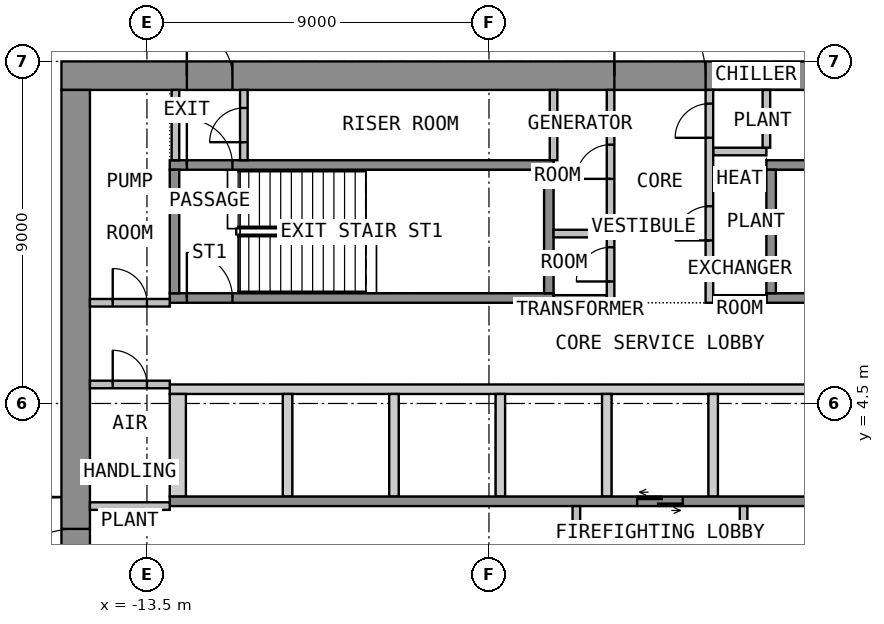
"""IFC4 building model, lengths in metres.
Left out: names, types, materials, properties, quantities, classifications, styles, units other than length and angle.
Written with IfcOpenShell. Run it as: python <this file> out.ifc"""

import sys

from ifc_helpers import new_model, si_unit, direction, frame, frame_2d, origin, place, context, subcontext, project, spatial, polyline, rectangle, outline, extrude, element, fill, save


model = new_model("IFC4")
c1 = context("Model", 3, precision=1e-05, world=origin(), true_north=direction((0.0, 1.0)))
c2 = subcontext(c1, "Body", "Model", "MODEL_VIEW")
j1 = project(units=[si_unit("LENGTHUNIT", "METRE"), si_unit("PLANEANGLEUNIT", "RADIAN")], contexts=[c1])
p1 = place(None, origin())
s1 = spatial("IfcSite", under=j1, at=p1, CompositionType="ELEMENT")
p2 = place(p1, origin())
s2 = spatial("IfcBuilding", under=s1, at=p2, CompositionType="ELEMENT")
p3 = place(p2, frame((0.0, 0.0, 128.1)))
s3 = spatial("IfcBuildingStorey", under=s2, at=p3, CompositionType="ELEMENT", Elevation=128.1)
p4 = place(p3, frame((-15.75, 13.125, 0.0), z_axis=(0.0, 0.0, 1.0), x_axis=(1.0, 0.0, 0.0)))
e1 = element("IfcWall", 1, at=p4, inside=s3, PredefinedType="SHEAR", context=c2, shape_type="SweptSolid", body=[
    extrude(rectangle(XDim=31.5, YDim=0.75, at=frame_2d((15.75, 0.0))), origin(), (0.0, 0.0, 1.0), 4.175),
])
p5 = place(p4, frame((14.55, 0.0, 0.0)))
e2 = element("IfcOpeningElement", 2, at=p5, cuts=e1, PredefinedType="OPENING", context=c2, shape_type="SweptSolid", body=[
    extrude(rectangle(XDim=2.4, YDim=2.1, at=frame_2d((1.2, 1.05))), frame((0.0, 0.385, 0.0), z_axis=(0.0, -1.0, 0.0), x_axis=(1.0, 0.0, 0.0)), (0.0, 0.0, 1.0), 0.77),
])
p6 = place(p4, frame((3.3, 0.0, 0.0)))
e3 = element("IfcOpeningElement", 3, at=p6, cuts=e1, PredefinedType="OPENING", context=c2, shape_type="SweptSolid", body=[
    extrude(rectangle(XDim=1.2, YDim=2.1, at=frame_2d((0.6, 1.05))), frame((0.0, 0.385, 0.0), z_axis=(0.0, -1.0, 0.0), x_axis=(1.0, 0.0, 0.0)), (0.0, 0.0, 1.0), 0.77),
])
p7 = place(p4, frame((27.0, 0.0, 0.0)))
e4 = element("IfcOpeningElement", 4, at=p7, cuts=e1, PredefinedType="OPENING", context=c2, shape_type="SweptSolid", body=[
    extrude(rectangle(XDim=1.2, YDim=2.1, at=frame_2d((0.6, 1.05))), frame((0.0, 0.385, 0.0), z_axis=(0.0, -1.0, 0.0), x_axis=(1.0, 0.0, 0.0)), (0.0, 0.0, 1.0), 0.77),
])
p8 = place(p3, frame((-15.375, -12.75, 0.0), z_axis=(0.0, 0.0, 1.0), x_axis=(0.0, 1.0, 0.0)))
e5 = element("IfcWall", 5, at=p8, inside=s3, PredefinedType="SHEAR", context=c2, shape_type="SweptSolid", body=[
    extrude(rectangle(XDim=25.5, YDim=0.75, at=frame_2d((12.75, 0.0))), origin(), (0.0, 0.0, 1.0), 4.175),
])
p9 = place(p8, frame((11.55, 0.0, 0.0)))
e6 = element("IfcOpeningElement", 6, at=p9, cuts=e5, PredefinedType="OPENING", context=c2, shape_type="SweptSolid", body=[
    extrude(rectangle(XDim=2.4, YDim=2.1, at=frame_2d((1.2, 1.05))), frame((0.0, 0.385, 0.0), z_axis=(0.0, -1.0, 0.0), x_axis=(1.0, 0.0, 0.0)), (0.0, 0.0, 1.0), 0.77),
])
p10 = place(p3, origin())
e7 = element("IfcWall", 7, at=p10, inside=s3, PredefinedType="SHEAR", context=c2, shape_type="SweptSolid", body=[
    extrude(outline(polyline([(-12.9, 4.75), (12.9, 4.75), (12.9, 5.0), (-12.9, 5.0), (-12.9, 4.75)])), origin(), (0.0, 0.0, 1.0), 4.175),
])
p11 = place(p3, origin())
e8 = element("IfcWall", 8, at=p11, inside=s3, PredefinedType="SHEAR", context=c2, shape_type="SweptSolid", body=[
    extrude(outline(polyline([(-12.9, 2.05), (-12.475, 2.05), (-12.475, 4.75), (-12.9, 4.75), (-12.9, 2.05)])), origin(), (0.0, 0.0, 1.0), 4.175),
])
p12 = place(p3, origin())
e9 = element("IfcWall", 9, at=p12, inside=s3, PredefinedType="SHEAR", context=c2, shape_type="SweptSolid", body=[
    extrude(outline(polyline([(-9.925, 2.05), (-9.675, 2.05), (-9.675, 4.75), (-9.925, 4.75), (-9.925, 2.05)])), origin(), (0.0, 0.0, 1.0), 4.175),
])
p13 = place(p3, origin())
e10 = element("IfcWall", 10, at=p13, inside=s3, PredefinedType="SHEAR", context=c2, shape_type="SweptSolid", body=[
    extrude(outline(polyline([(-7.125, 2.05), (-6.875, 2.05), (-6.875, 4.75), (-7.125, 4.75), (-7.125, 2.05)])), origin(), (0.0, 0.0, 1.0), 4.175),
])
p14 = place(p3, origin())
e11 = element("IfcWall", 11, at=p14, inside=s3, PredefinedType="SHEAR", context=c2, shape_type="SweptSolid", body=[
    extrude(outline(polyline([(-4.325, 2.05), (-4.075, 2.05), (-4.075, 4.75), (-4.325, 4.75), (-4.325, 2.05)])), origin(), (0.0, 0.0, 1.0), 4.175),
])
p15 = place(p3, origin())
e12 = element("IfcWall", 12, at=p15, inside=s3, PredefinedType="SHEAR", context=c2, shape_type="SweptSolid", body=[
    extrude(outline(polyline([(-1.525, 2.05), (-1.275, 2.05), (-1.275, 4.75), (-1.525, 4.75), (-1.525, 2.05)])), origin(), (0.0, 0.0, 1.0), 4.175),
])
p16 = place(p3, origin())
e13 = element("IfcWall", 13, at=p16, inside=s3, PredefinedType="SHEAR", context=c2, shape_type="SweptSolid", body=[
    extrude(outline(polyline([(1.275, 2.05), (1.525, 2.05), (1.525, 4.75), (1.275, 4.75), (1.275, 2.05)])), origin(), (0.0, 0.0, 1.0), 4.175),
])
p17 = place(p3, frame((-12.9, 1.925, 0.0), z_axis=(0.0, 0.0, 1.0), x_axis=(1.0, 0.0, 0.0)))
e14 = element("IfcWall", 14, at=p17, inside=s3, PredefinedType="SHEAR", context=c2, shape_type="SweptSolid", body=[
    extrude(rectangle(XDim=25.8, YDim=0.25, at=frame_2d((12.9, 0.0))), origin(), (0.0, 0.0, 1.0), 4.175),
])
p18 = place(p17, frame((12.3, 0.0, 0.0)))
e15 = element("IfcOpeningElement", 15, at=p18, cuts=e14, PredefinedType="OPENING", context=c2, shape_type="SweptSolid", body=[
    extrude(rectangle(XDim=1.2, YDim=2.1, at=frame_2d((0.6, 1.05))), frame((0.0, 0.135, 0.0), z_axis=(0.0, -1.0, 0.0), x_axis=(1.0, 0.0, 0.0)), (0.0, 0.0, 1.0), 0.27),
])
p19 = place(p17, frame((23.5, 0.0, 0.0)))
e16 = element("IfcOpeningElement", 16, at=p19, cuts=e14, PredefinedType="OPENING", context=c2, shape_type="SweptSolid", body=[
    extrude(rectangle(XDim=1.2, YDim=2.1, at=frame_2d((0.6, 1.05))), frame((0.0, 0.135, 0.0), z_axis=(0.0, -1.0, 0.0), x_axis=(1.0, 0.0, 0.0)), (0.0, 0.0, 1.0), 0.27),
])
p20 = place(p3, frame((-2.2, -1.8, 0.0), z_axis=(0.0, 0.0, 1.0), x_axis=(0.0, 1.0, 0.0)))
e17 = element("IfcWall", 17, at=p20, inside=s3, PredefinedType="PARTITIONING", context=c2, shape_type="SweptSolid", body=[
    extrude(rectangle(XDim=3.6, YDim=0.2, at=frame_2d((1.8, 0.0))), origin(), (0.0, 0.0, 1.0), 4.175),
])
p21 = place(p20, frame((1.2, 0.0, 0.0)))
e18 = element("IfcOpeningElement", 18, at=p21, cuts=e17, PredefinedType="OPENING", context=c2, shape_type="SweptSolid", body=[
    extrude(rectangle(XDim=1.2, YDim=2.1, at=frame_2d((0.6, 1.05))), frame((0.0, 0.11, 0.0), z_axis=(0.0, -1.0, 0.0), x_axis=(1.0, 0.0, 0.0)), (0.0, 0.0, 1.0), 0.22),
])
p22 = place(p3, frame((2.2, -1.8, 0.0), z_axis=(0.0, 0.0, 1.0), x_axis=(0.0, 1.0, 0.0)))
e19 = element("IfcWall", 19, at=p22, inside=s3, PredefinedType="PARTITIONING", context=c2, shape_type="SweptSolid", body=[
    extrude(rectangle(XDim=3.6, YDim=0.2, at=frame_2d((1.8, 0.0))), origin(), (0.0, 0.0, 1.0), 4.175),
])
p23 = place(p22, frame((1.2, 0.0, 0.0)))
e20 = element("IfcOpeningElement", 20, at=p23, cuts=e19, PredefinedType="OPENING", context=c2, shape_type="SweptSolid", body=[
    extrude(rectangle(XDim=1.2, YDim=2.1, at=frame_2d((0.6, 1.05))), frame((0.0, 0.11, 0.0), z_axis=(0.0, -1.0, 0.0), x_axis=(1.0, 0.0, 0.0)), (0.0, 0.0, 1.0), 0.22),
])
p24 = place(p3, frame((-12.9, 7.275, 0.0), z_axis=(0.0, 0.0, 1.0), x_axis=(1.0, 0.0, 0.0)))
e21 = element("IfcWall", 21, at=p24, inside=s3, PredefinedType="SHEAR", context=c2, shape_type="SweptSolid", body=[
    extrude(rectangle(XDim=10.1, YDim=0.25, at=frame_2d((5.05, 0.0))), origin(), (0.0, 0.0, 1.0), 4.175),
])
p25 = place(p24, frame((0.45, 0.0, 0.0)))
e22 = element("IfcOpeningElement", 22, at=p25, cuts=e21, PredefinedType="OPENING", context=c2, shape_type="SweptSolid", body=[
    extrude(rectangle(XDim=1.2, YDim=2.1, at=frame_2d((0.6, 1.05))), frame((0.0, 0.135, 0.0), z_axis=(0.0, -1.0, 0.0), x_axis=(1.0, 0.0, 0.0)), (0.0, 0.0, 1.0), 0.27),
])
p26 = place(p3, frame((-12.9, 10.775, 0.0), z_axis=(0.0, 0.0, 1.0), x_axis=(1.0, 0.0, 0.0)))
e23 = element("IfcWall", 23, at=p26, inside=s3, PredefinedType="SHEAR", context=c2, shape_type="SweptSolid", body=[
    extrude(rectangle(XDim=10.1, YDim=0.25, at=frame_2d((5.05, 0.0))), origin(), (0.0, 0.0, 1.0), 4.175),
])
p27 = place(p26, frame((0.45, 0.0, 0.0)))
e24 = element("IfcOpeningElement", 24, at=p27, cuts=e23, PredefinedType="OPENING", context=c2, shape_type="SweptSolid", body=[
    extrude(rectangle(XDim=1.2, YDim=2.1, at=frame_2d((0.6, 1.05))), frame((0.0, 0.135, 0.0), z_axis=(0.0, -1.0, 0.0), x_axis=(1.0, 0.0, 0.0)), (0.0, 0.0, 1.0), 0.27),
])
for number, where, z_axis, x_axis in (
    (25, (-12.775, 7.4, 0.0), (0.0, 0.0, 1.0), (0.0, 1.0, 0.0)),
    (26, (-2.925, 7.4, 0.0), (0.0, 0.0, 1.0), (0.0, 1.0, 0.0)),
):
    element("IfcWall", number, at=place(p3, frame(where, z_axis=z_axis, x_axis=x_axis)), inside=s3, PredefinedType="SHEAR", context=c2, shape_type="SweptSolid", body=[
        extrude(rectangle(XDim=3.25, YDim=0.25, at=frame_2d((1.625, 0.0))), origin(), (0.0, 0.0, 1.0), 4.175),
    ])
p28 = place(p3, frame((2.8, 7.275, 0.0), z_axis=(0.0, 0.0, 1.0), x_axis=(1.0, 0.0, 0.0)))
e27 = element("IfcWall", 27, at=p28, inside=s3, PredefinedType="SHEAR", context=c2, shape_type="SweptSolid", body=[
    extrude(rectangle(XDim=10.1, YDim=0.25, at=frame_2d((5.05, 0.0))), origin(), (0.0, 0.0, 1.0), 4.175),
])
p29 = place(p28, frame((8.45, 0.0, 0.0)))
e28 = element("IfcOpeningElement", 28, at=p29, cuts=e27, PredefinedType="OPENING", context=c2, shape_type="SweptSolid", body=[
    extrude(rectangle(XDim=1.2, YDim=2.1, at=frame_2d((0.6, 1.05))), frame((0.0, 0.135, 0.0), z_axis=(0.0, -1.0, 0.0), x_axis=(1.0, 0.0, 0.0)), (0.0, 0.0, 1.0), 0.27),
])
p30 = place(p3, frame((2.8, 10.775, 0.0), z_axis=(0.0, 0.0, 1.0), x_axis=(1.0, 0.0, 0.0)))
e29 = element("IfcWall", 29, at=p30, inside=s3, PredefinedType="SHEAR", context=c2, shape_type="SweptSolid", body=[
    extrude(rectangle(XDim=10.1, YDim=0.25, at=frame_2d((5.05, 0.0))), origin(), (0.0, 0.0, 1.0), 4.175),
])
p31 = place(p30, frame((8.45, 0.0, 0.0)))
e30 = element("IfcOpeningElement", 30, at=p31, cuts=e29, PredefinedType="OPENING", context=c2, shape_type="SweptSolid", body=[
    extrude(rectangle(XDim=1.2, YDim=2.1, at=frame_2d((0.6, 1.05))), frame((0.0, 0.135, 0.0), z_axis=(0.0, -1.0, 0.0), x_axis=(1.0, 0.0, 0.0)), (0.0, 0.0, 1.0), 0.27),
])
p32 = place(p3, frame((2.925, 7.4, 0.0), z_axis=(0.0, 0.0, 1.0), x_axis=(0.0, 1.0, 0.0)))
e31 = element("IfcWall", 31, at=p32, inside=s3, PredefinedType="SHEAR", context=c2, shape_type="SweptSolid", body=[
    extrude(rectangle(XDim=3.25, YDim=0.25, at=frame_2d((1.625, 0.0))), origin(), (0.0, 0.0, 1.0), 4.175),
])
for number, where, z_axis, x_axis in (
    (32, (-2.8, 7.25, 0.0), (0.0, 0.0, 1.0), (1.0, 0.0, 0.0)),
    (33, (-2.8, 8.97, 0.0), (0.0, 0.0, 1.0), (1.0, 0.0, 0.0)),
    (34, (1.4, 7.25, 0.0), (0.0, 0.0, 1.0), (1.0, 0.0, 0.0)),
    (35, (1.4, 11.13, 0.0), (0.0, 0.0, 1.0), (1.0, 0.0, 0.0)),
):
    element("IfcWall", number, at=place(p3, frame(where, z_axis=z_axis, x_axis=x_axis)), inside=s3, PredefinedType="PARTITIONING", context=c2, shape_type="SweptSolid", body=[
        extrude(rectangle(XDim=1.4, YDim=0.2, at=frame_2d((0.7, 0.0))), origin(), (0.0, 0.0, 1.0), 4.175),
    ])
p33 = place(p3, frame((-1.3, 7.15, 0.0), z_axis=(0.0, 0.0, 1.0), x_axis=(0.0, 1.0, 0.0)))
e36 = element("IfcWall", 36, at=p33, inside=s3, PredefinedType="PARTITIONING", context=c2, shape_type="SweptSolid", body=[
    extrude(rectangle(XDim=5.6, YDim=0.2, at=frame_2d((2.8, 0.0))), origin(), (0.0, 0.0, 1.0), 4.175),
])
p34 = place(p33, frame((0.56, 0.0, 0.0)))
e37 = element("IfcOpeningElement", 37, at=p34, cuts=e36, PredefinedType="OPENING", context=c2, shape_type="SweptSolid", body=[
    extrude(rectangle(XDim=0.9, YDim=2.1, at=frame_2d((0.45, 1.05))), frame((0.0, 0.11, 0.0), z_axis=(0.0, -1.0, 0.0), x_axis=(1.0, 0.0, 0.0)), (0.0, 0.0, 1.0), 0.22),
])
p35 = place(p33, frame((3.26, 0.0, 0.0)))
e38 = element("IfcOpeningElement", 38, at=p35, cuts=e36, PredefinedType="OPENING", context=c2, shape_type="SweptSolid", body=[
    extrude(rectangle(XDim=0.9, YDim=2.1, at=frame_2d((0.45, 1.05))), frame((0.0, 0.11, 0.0), z_axis=(0.0, -1.0, 0.0), x_axis=(1.0, 0.0, 0.0)), (0.0, 0.0, 1.0), 0.22),
])
p36 = place(p3, frame((1.3, 7.15, 0.0), z_axis=(0.0, 0.0, 1.0), x_axis=(0.0, 1.0, 0.0)))
e39 = element("IfcWall", 39, at=p36, inside=s3, PredefinedType="PARTITIONING", context=c2, shape_type="SweptSolid", body=[
    extrude(rectangle(XDim=5.6, YDim=0.2, at=frame_2d((2.8, 0.0))), origin(), (0.0, 0.0, 1.0), 4.175),
])
p37 = place(p36, frame((1.64, 0.0, 0.0)))
e40 = element("IfcOpeningElement", 40, at=p37, cuts=e39, PredefinedType="OPENING", context=c2, shape_type="SweptSolid", body=[
    extrude(rectangle(XDim=0.9, YDim=2.1, at=frame_2d((0.45, 1.05))), frame((0.0, 0.11, 0.0), z_axis=(0.0, -1.0, 0.0), x_axis=(1.0, 0.0, 0.0)), (0.0, 0.0, 1.0), 0.22),
])
p38 = place(p36, frame((4.34, 0.0, 0.0)))
e41 = element("IfcOpeningElement", 41, at=p38, cuts=e39, PredefinedType="OPENING", context=c2, shape_type="SweptSolid", body=[
    extrude(rectangle(XDim=0.9, YDim=2.1, at=frame_2d((0.45, 1.05))), frame((0.0, 0.11, 0.0), z_axis=(0.0, -1.0, 0.0), x_axis=(1.0, 0.0, 0.0)), (0.0, 0.0, 1.0), 0.22),
])
p39 = place(p3, frame((-12.75, 10.9, 0.0), z_axis=(0.0, 0.0, 1.0), x_axis=(0.0, 1.0, 0.0)))
e42 = element("IfcWall", 42, at=p39, inside=s3, PredefinedType="PARTITIONING", context=c2, shape_type="SweptSolid", body=[
    extrude(rectangle(XDim=1.85, YDim=0.2, at=frame_2d((0.925, 0.0))), origin(), (0.0, 0.0, 1.0), 4.175),
])
p40 = place(p3, frame((-10.95, 10.9, 0.0), z_axis=(0.0, 0.0, 1.0), x_axis=(0.0, 1.0, 0.0)))
e43 = element("IfcWall", 43, at=p40, inside=s3, PredefinedType="PARTITIONING", context=c2, shape_type="SweptSolid", body=[
    extrude(rectangle(XDim=1.85, YDim=0.2, at=frame_2d((0.925, 0.0))), origin(), (0.0, 0.0, 1.0), 4.175),
])
p41 = place(p40, frame((0.475, 0.0, 0.0)))
e44 = element("IfcOpeningElement", 44, at=p41, cuts=e43, PredefinedType="OPENING", context=c2, shape_type="SweptSolid", body=[
    extrude(rectangle(XDim=0.9, YDim=2.1, at=frame_2d((0.45, 1.05))), frame((0.0, 0.11, 0.0), z_axis=(0.0, -1.0, 0.0), x_axis=(1.0, 0.0, 0.0)), (0.0, 0.0, 1.0), 0.22),
])
p42 = place(p3, frame((-15.0, 7.15, 0.0), z_axis=(0.0, 0.0, 1.0), x_axis=(1.0, 0.0, 0.0)))
e45 = element("IfcWall", 45, at=p42, inside=s3, PredefinedType="PARTITIONING", context=c2, shape_type="SweptSolid", body=[
    extrude(rectangle(XDim=2.1, YDim=0.2, at=frame_2d((1.05, 0.0))), origin(), (0.0, 0.0, 1.0), 4.175),
])
p43 = place(p42, frame((0.6, 0.0, 0.0)))
e46 = element("IfcOpeningElement", 46, at=p43, cuts=e45, PredefinedType="OPENING", context=c2, shape_type="SweptSolid", body=[
    extrude(rectangle(XDim=0.9, YDim=2.1, at=frame_2d((0.45, 1.05))), frame((0.0, 0.11, 0.0), z_axis=(0.0, -1.0, 0.0), x_axis=(1.0, 0.0, 0.0)), (0.0, 0.0, 1.0), 0.22),
])
p44 = place(p3, frame((-15.0, 5.0, 0.0), z_axis=(0.0, 0.0, 1.0), x_axis=(1.0, 0.0, 0.0)))
e47 = element("IfcWall", 47, at=p44, inside=s3, PredefinedType="PARTITIONING", context=c2, shape_type="SweptSolid", body=[
    extrude(rectangle(XDim=2.1, YDim=0.2, at=frame_2d((1.05, 0.0))), origin(), (0.0, 0.0, 1.0), 4.175),
])
p45 = place(p44, frame((0.6, 0.0, 0.0)))
e48 = element("IfcOpeningElement", 48, at=p45, cuts=e47, PredefinedType="OPENING", context=c2, shape_type="SweptSolid", body=[
    extrude(rectangle(XDim=0.9, YDim=2.1, at=frame_2d((0.45, 1.05))), frame((0.0, 0.11, 0.0), z_axis=(0.0, -1.0, 0.0), x_axis=(1.0, 0.0, 0.0)), (0.0, 0.0, 1.0), 0.22),
])
p46 = place(p3, frame((-15.0, 1.8, 0.0), z_axis=(0.0, 0.0, 1.0), x_axis=(1.0, 0.0, 0.0)))
e49 = element("IfcWall", 49, at=p46, inside=s3, PredefinedType="PARTITIONING", context=c2, shape_type="SweptSolid", body=[
    extrude(rectangle(XDim=2.1, YDim=0.2, at=frame_2d((1.05, 0.0))), origin(), (0.0, 0.0, 1.0), 4.175),
])
p47 = place(p3, frame((-2.8, 10.901, 0.0), z_axis=(0.0, 0.0, 1.0), x_axis=(0.0, 1.0, 0.0)))
e50 = element("IfcWall", 50, at=p47, inside=s3, PredefinedType="PARTITIONING", context=c2, shape_type="SweptSolid", body=[
    extrude(rectangle(XDim=1.848, YDim=0.2, at=frame_2d((0.924, 0.0))), origin(), (0.0, 0.0, 1.0), 4.175),
])
p48 = place(p3, frame((2.8, 12.749, 0.0), z_axis=(0.0, 0.0, 1.0), x_axis=(0.0, -1.0, 0.0)))
e51 = element("IfcWall", 51, at=p48, inside=s3, PredefinedType="PARTITIONING", context=c2, shape_type="SweptSolid", body=[
    extrude(rectangle(XDim=1.518, YDim=0.2, at=frame_2d((0.759, 0.0))), origin(), (0.0, 0.0, 1.0), 4.175),
])
p49 = place(p9, origin())
e52 = element("IfcDoor", 52, at=p49, inside=s3, OperationType="DOUBLE_DOOR_DOUBLE_SWING", PredefinedType="DOOR", context=c2, shape_type="SweptSolid", body=[
    extrude(rectangle(XDim=2.4, YDim=2.1, at=frame_2d((1.2, 1.05))), frame((0.0, 0.025, 0.0), z_axis=(0.0, -1.0, 0.0), x_axis=(1.0, 0.0, 0.0)), (0.0, 0.0, 1.0), 0.05),
])
fill(e6, e52)
p50 = place(p5, origin())
e53 = element("IfcDoor", 53, at=p50, inside=s3, OperationType="DOUBLE_DOOR_DOUBLE_SWING", PredefinedType="DOOR", context=c2, shape_type="SweptSolid", body=[
    extrude(rectangle(XDim=2.4, YDim=2.1, at=frame_2d((1.2, 1.05))), frame((0.0, 0.025, 0.0), z_axis=(0.0, -1.0, 0.0), x_axis=(1.0, 0.0, 0.0)), (0.0, 0.0, 1.0), 0.05),
])
fill(e2, e53)
p51 = place(p6, origin())
e54 = element("IfcDoor", 54, at=p51, inside=s3, OperationType="SINGLE_SWING_RIGHT", PredefinedType="DOOR", context=c2, shape_type="SweptSolid", body=[
    extrude(rectangle(XDim=1.2, YDim=2.1, at=frame_2d((0.6, 1.05))), frame((0.0, 0.025, 0.0), z_axis=(0.0, -1.0, 0.0), x_axis=(1.0, 0.0, 0.0)), (0.0, 0.0, 1.0), 0.05),
])
fill(e3, e54)
p52 = place(p18, origin())
e55 = element("IfcDoor", 55, at=p52, inside=s3, OperationType="DOUBLE_DOOR_SLIDING", PredefinedType="DOOR", context=c2, shape_type="SweptSolid", body=[
    extrude(rectangle(XDim=1.2, YDim=2.1, at=frame_2d((0.6, 1.05))), frame((0.0, 0.025, 0.0), z_axis=(0.0, -1.0, 0.0), x_axis=(1.0, 0.0, 0.0)), (0.0, 0.0, 1.0), 0.05),
])
fill(e15, e55)
p53 = place(p25, origin())
e56 = element("IfcDoor", 56, at=p53, inside=s3, OperationType="SINGLE_SWING_LEFT", PredefinedType="DOOR", context=c2, shape_type="SweptSolid", body=[
    extrude(rectangle(XDim=1.2, YDim=2.1, at=frame_2d((0.6, 1.05))), frame((0.0, 0.025, 0.0), z_axis=(0.0, -1.0, 0.0), x_axis=(1.0, 0.0, 0.0)), (0.0, 0.0, 1.0), 0.05),
])
fill(e22, e56)
p54 = place(p34, origin())
e57 = element("IfcDoor", 57, at=p54, inside=s3, OperationType="SINGLE_SWING_LEFT", PredefinedType="DOOR", context=c2, shape_type="SweptSolid", body=[
    extrude(rectangle(XDim=0.9, YDim=2.1, at=frame_2d((0.45, 1.05))), frame((0.0, 0.025, 0.0), z_axis=(0.0, -1.0, 0.0), x_axis=(1.0, 0.0, 0.0)), (0.0, 0.0, 1.0), 0.05),
])
fill(e37, e57)
p55 = place(p35, origin())
e58 = element("IfcDoor", 58, at=p55, inside=s3, OperationType="SINGLE_SWING_LEFT", PredefinedType="DOOR", context=c2, shape_type="SweptSolid", body=[
    extrude(rectangle(XDim=0.9, YDim=2.1, at=frame_2d((0.45, 1.05))), frame((0.0, 0.025, 0.0), z_axis=(0.0, -1.0, 0.0), x_axis=(1.0, 0.0, 0.0)), (0.0, 0.0, 1.0), 0.05),
])
fill(e38, e58)
p56 = place(p37, origin())
e59 = element("IfcDoor", 59, at=p56, inside=s3, OperationType="SINGLE_SWING_LEFT", PredefinedType="DOOR", context=c2, shape_type="SweptSolid", body=[
    extrude(rectangle(XDim=0.9, YDim=2.1, at=frame_2d((0.45, 1.05))), frame((0.0, 0.025, 0.0), z_axis=(0.0, -1.0, 0.0), x_axis=(1.0, 0.0, 0.0)), (0.0, 0.0, 1.0), 0.05),
])
fill(e40, e59)
p57 = place(p38, origin())
e60 = element("IfcDoor", 60, at=p57, inside=s3, OperationType="SINGLE_SWING_LEFT", PredefinedType="DOOR", context=c2, shape_type="SweptSolid", body=[
    extrude(rectangle(XDim=0.9, YDim=2.1, at=frame_2d((0.45, 1.05))), frame((0.0, 0.025, 0.0), z_axis=(0.0, -1.0, 0.0), x_axis=(1.0, 0.0, 0.0)), (0.0, 0.0, 1.0), 0.05),
])
fill(e41, e60)
p58 = place(p27, origin())
e61 = element("IfcDoor", 61, at=p58, inside=s3, OperationType="SINGLE_SWING_RIGHT", PredefinedType="DOOR", context=c2, shape_type="SweptSolid", body=[
    extrude(rectangle(XDim=1.2, YDim=2.1, at=frame_2d((0.6, 1.05))), frame((0.0, 0.025, 0.0), z_axis=(0.0, -1.0, 0.0), x_axis=(1.0, 0.0, 0.0)), (0.0, 0.0, 1.0), 0.05),
])
fill(e24, e61)
p59 = place(p41, origin())
e62 = element("IfcDoor", 62, at=p59, inside=s3, OperationType="SINGLE_SWING_LEFT", PredefinedType="DOOR", context=c2, shape_type="SweptSolid", body=[
    extrude(rectangle(XDim=0.9, YDim=2.1, at=frame_2d((0.45, 1.05))), frame((0.0, 0.025, 0.0), z_axis=(0.0, -1.0, 0.0), x_axis=(1.0, 0.0, 0.0)), (0.0, 0.0, 1.0), 0.05),
])
fill(e44, e62)
p60 = place(p43, origin())
e63 = element("IfcDoor", 63, at=p60, inside=s3, OperationType="SINGLE_SWING_LEFT", PredefinedType="DOOR", context=c2, shape_type="SweptSolid", body=[
    extrude(rectangle(XDim=0.9, YDim=2.1, at=frame_2d((0.45, 1.05))), frame((0.0, 0.025, 0.0), z_axis=(0.0, -1.0, 0.0), x_axis=(1.0, 0.0, 0.0)), (0.0, 0.0, 1.0), 0.05),
])
fill(e46, e63)
p61 = place(p45, origin())
e64 = element("IfcDoor", 64, at=p61, inside=s3, OperationType="SINGLE_SWING_LEFT", PredefinedType="DOOR", context=c2, shape_type="SweptSolid", body=[
    extrude(rectangle(XDim=0.9, YDim=2.1, at=frame_2d((0.45, 1.05))), frame((0.0, 0.025, 0.0), z_axis=(0.0, -1.0, 0.0), x_axis=(1.0, 0.0, 0.0)), (0.0, 0.0, 1.0), 0.05),
])
fill(e48, e64)
save(model, sys.argv[1])
